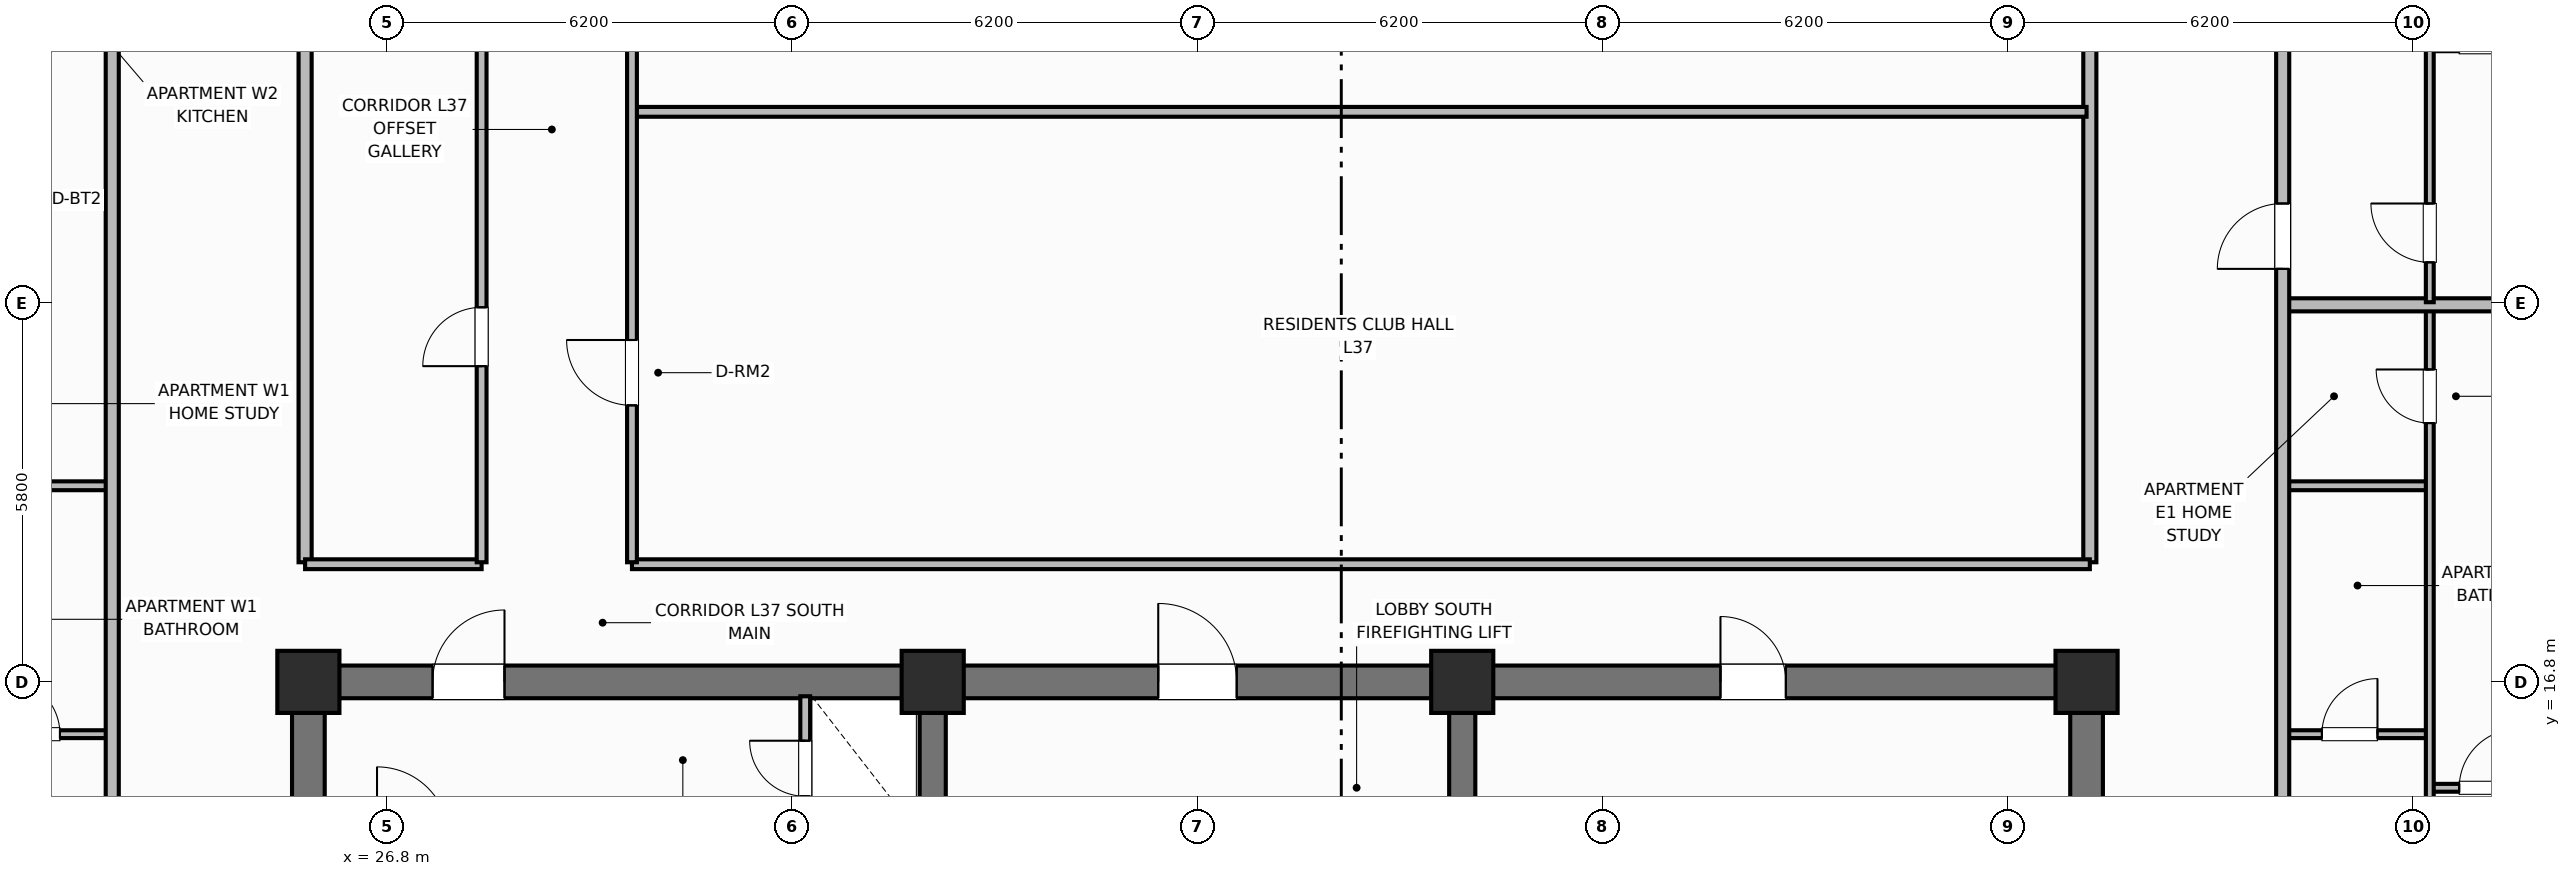
"""IFC4 building model, lengths in metres.
Left out: names, types, materials, properties, quantities, classifications, styles, units other than length and angle.
Written with IfcOpenShell. Run it as: python <this file> out.ifc"""

import sys

from ifc_helpers import new_model, si_unit, direction, frame, frame_2d, origin, origin_2d, place, context, subcontext, project, spatial, rectangle, extrude, element, fill, save


model = new_model("IFC4")
c1 = context("Model", 3, precision=1e-05, world=origin(), true_north=direction((0.0, 1.0)))
c2 = subcontext(c1, "Body", "Model", "MODEL_VIEW")
j1 = project(units=[si_unit("LENGTHUNIT", "METRE"), si_unit("PLANEANGLEUNIT", "RADIAN")], contexts=[c1])
p1 = place(None, origin())
s1 = spatial("IfcSite", under=j1, at=p1, CompositionType="ELEMENT")
p2 = place(p1, origin())
s2 = spatial("IfcBuilding", under=s1, at=p2, CompositionType="ELEMENT")
p3 = place(p2, frame((0.0, 0.0, 151.5)))
s3 = spatial("IfcBuildingStorey", under=s2, at=p3, CompositionType="ELEMENT", Elevation=151.5)
for number, where, z_axis, x_axis in (
    (1, (25.6, 10.85, 0.0), (0.0, 0.0, 1.0), (0.0, 1.0, 0.0)),
    (2, (52.8, 10.85, 0.0), (0.0, 0.0, 1.0), (0.0, 1.0, 0.0)),
):
    element("IfcWall", number, at=place(p3, frame(where, z_axis=z_axis, x_axis=x_axis)), inside=s3, PredefinedType="SHEAR", context=c2, shape_type="SweptSolid", body=[
        extrude(rectangle(XDim=5.7, YDim=0.5, at=frame_2d((2.85, 0.0))), origin(), (0.0, 0.0, 1.0), 3.7),
    ])
p4 = place(p3, frame((25.6, 16.8, 0.0), z_axis=(0.0, 0.0, 1.0), x_axis=(1.0, 0.0, 0.0)))
e3 = element("IfcWall", 3, at=p4, inside=s3, PredefinedType="SHEAR", context=c2, shape_type="SweptSolid", body=[
    extrude(rectangle(XDim=27.2, YDim=0.5, at=frame_2d((13.6, 0.0))), origin(), (0.0, 0.0, 1.0), 3.7),
])
p5 = place(p4, frame((1.9, 0.0, 0.0)))
e4 = element("IfcOpeningElement", 4, at=p5, cuts=e3, PredefinedType="OPENING", context=c2, shape_type="SweptSolid", body=[
    extrude(rectangle(XDim=1.1, YDim=2.15, at=frame_2d((0.55, 1.075))), frame((0.0, 0.26, 0.0), z_axis=(0.0, -1.0, 0.0), x_axis=(1.0, 0.0, 0.0)), (0.0, 0.0, 1.0), 0.52),
])
p6 = place(p4, frame((13.0, 0.0, 0.0)))
e5 = element("IfcOpeningElement", 5, at=p6, cuts=e3, PredefinedType="OPENING", context=c2, shape_type="SweptSolid", body=[
    extrude(rectangle(XDim=1.2, YDim=2.15, at=frame_2d((0.6, 1.075))), frame((0.0, 0.26, 0.0), z_axis=(0.0, -1.0, 0.0), x_axis=(1.0, 0.0, 0.0)), (0.0, 0.0, 1.0), 0.52),
])
p7 = place(p4, frame((21.6, 0.0, 0.0)))
e6 = element("IfcOpeningElement", 6, at=p7, cuts=e3, PredefinedType="OPENING", context=c2, shape_type="SweptSolid", body=[
    extrude(rectangle(XDim=1.0, YDim=2.15, at=frame_2d((0.5, 1.075))), frame((0.0, 0.26, 0.0), z_axis=(0.0, -1.0, 0.0), x_axis=(1.0, 0.0, 0.0)), (0.0, 0.0, 1.0), 0.52),
])
for number, where, z_axis, x_axis in (
    (7, (35.15, 10.85, 0.0), (0.0, 0.0, 1.0), (0.0, 1.0, 0.0)),
    (8, (43.25, 10.85, 0.0), (0.0, 0.0, 1.0), (0.0, 1.0, 0.0)),
):
    element("IfcWall", number, at=place(p3, frame(where, z_axis=z_axis, x_axis=x_axis)), inside=s3, PredefinedType="SHEAR", context=c2, shape_type="SweptSolid", body=[
        extrude(rectangle(XDim=5.7, YDim=0.4, at=frame_2d((2.85, 0.0))), origin(), (0.0, 0.0, 1.0), 3.7),
    ])
for number, where, z_axis, x_axis in (
    (9, (25.6, 16.8, 0.0), (0.0, 0.0, 1.0), (1.0, 0.0, 0.0)),
    (10, (35.15, 16.8, 0.0), (0.0, 0.0, 1.0), (1.0, 0.0, 0.0)),
    (11, (43.25, 16.8, 0.0), (0.0, 0.0, 1.0), (1.0, 0.0, 0.0)),
    (12, (52.8, 16.8, 0.0), (0.0, 0.0, 1.0), (1.0, 0.0, 0.0)),
):
    element("IfcColumn", number, at=place(p3, frame(where, z_axis=z_axis, x_axis=x_axis)), inside=s3, PredefinedType="COLUMN", context=c2, shape_type="SweptSolid", body=[
        extrude(rectangle(XDim=0.95, YDim=0.95, at=origin_2d()), origin(), (0.0, 0.0, 1.0), 3.7),
    ])
p8 = place(p3, frame((33.2, 14.5, 0.0), z_axis=(0.0, 0.0, 1.0), x_axis=(0.0, 1.0, 0.0)))
e13 = element("IfcWall", 13, at=p8, inside=s3, PredefinedType="PARTITIONING", context=c2, shape_type="SweptSolid", body=[
    extrude(rectangle(XDim=2.08, YDim=0.15, at=frame_2d((1.04, 0.0))), origin(), (0.0, 0.0, 1.0), 2.55),
])
p9 = place(p8, frame((0.55, 0.0, 0.0)))
e14 = element("IfcOpeningElement", 14, at=p9, cuts=e13, PredefinedType="OPENING", context=c2, shape_type="SweptSolid", body=[
    extrude(rectangle(XDim=0.85, YDim=2.05, at=frame_2d((0.425, 1.025))), frame((0.0, 0.085, 0.0), z_axis=(0.0, -1.0, 0.0), x_axis=(1.0, 0.0, 0.0)), (0.0, 0.0, 1.0), 0.17),
])
for number, where, z_axis, x_axis in (
    (15, (25.55, 18.63, 0.0), (0.0, 0.0, 1.0), (0.0, 1.0, 0.0)),
    (16, (52.85, 18.63, 0.0), (0.0, 0.0, 1.0), (0.0, 1.0, 0.0)),
):
    element("IfcWall", number, at=place(p3, frame(where, z_axis=z_axis, x_axis=x_axis)), inside=s3, PredefinedType="PARTITIONING", context=c2, shape_type="SweptSolid", body=[
        extrude(rectangle(XDim=19.14, YDim=0.2, at=frame_2d((9.57, 0.0))), origin(), (0.0, 0.0, 1.0), 2.55),
    ])
p10 = place(p3, frame((25.55, 18.6, 0.0), z_axis=(0.0, 0.0, 1.0), x_axis=(1.0, 0.0, 0.0)))
e17 = element("IfcWall", 17, at=p10, inside=s3, PredefinedType="PARTITIONING", context=c2, shape_type="SweptSolid", body=[
    extrude(rectangle(XDim=2.7, YDim=0.15, at=frame_2d((1.35, 0.0))), origin(), (0.0, 0.0, 1.0), 2.55),
])
p11 = place(p3, frame((30.55, 18.6, 0.0), z_axis=(0.0, 0.0, 1.0), x_axis=(1.0, 0.0, 0.0)))
e18 = element("IfcWall", 18, at=p11, inside=s3, PredefinedType="PARTITIONING", context=c2, shape_type="SweptSolid", body=[
    extrude(rectangle(XDim=22.3, YDim=0.15, at=frame_2d((11.15, 0.0))), origin(), (0.0, 0.0, 1.0), 2.55),
])
p12 = place(p3, frame((30.58, 25.521, 0.0), z_axis=(0.0, 0.0, 1.0), x_axis=(1.0, 0.0, 0.0)))
e19 = element("IfcWall", 19, at=p12, inside=s3, PredefinedType="PARTITIONING", context=c2, shape_type="SweptSolid", body=[
    extrude(rectangle(XDim=22.22, YDim=0.15, at=frame_2d((11.11, 0.0))), origin(), (0.0, 0.0, 1.0), 2.55),
])
p13 = place(p3, frame((28.25, 18.63, 0.0), z_axis=(0.0, 0.0, 1.0), x_axis=(0.0, 1.0, 0.0)))
e20 = element("IfcWall", 20, at=p13, inside=s3, PredefinedType="PARTITIONING", context=c2, shape_type="SweptSolid", body=[
    extrude(rectangle(XDim=19.14, YDim=0.15, at=frame_2d((9.57, 0.0))), origin(), (0.0, 0.0, 1.0), 2.55),
])
p14 = place(p13, frame((3.0, 0.0, 0.0)))
e21 = element("IfcOpeningElement", 21, at=p14, cuts=e20, PredefinedType="OPENING", context=c2, shape_type="SweptSolid", body=[
    extrude(rectangle(XDim=0.9, YDim=2.1, at=frame_2d((0.45, 1.05))), frame((0.0, 0.085, 0.0), z_axis=(0.0, -1.0, 0.0), x_axis=(1.0, 0.0, 0.0)), (0.0, 0.0, 1.0), 0.17),
])
p15 = place(p13, frame((11.5, 0.0, 0.0)))
e22 = element("IfcOpeningElement", 22, at=p15, cuts=e20, PredefinedType="OPENING", context=c2, shape_type="SweptSolid", body=[
    extrude(rectangle(XDim=0.9, YDim=2.1, at=frame_2d((0.45, 1.05))), frame((0.0, 0.085, 0.0), z_axis=(0.0, -1.0, 0.0), x_axis=(1.0, 0.0, 0.0)), (0.0, 0.0, 1.0), 0.17),
])
p16 = place(p3, frame((30.55, 18.63, 0.0), z_axis=(0.0, 0.0, 1.0), x_axis=(0.0, 1.0, 0.0)))
e23 = element("IfcWall", 23, at=p16, inside=s3, PredefinedType="PARTITIONING", context=c2, shape_type="SweptSolid", body=[
    extrude(rectangle(XDim=19.14, YDim=0.15, at=frame_2d((9.57, 0.0))), origin(), (0.0, 0.0, 1.0), 2.55),
])
p17 = place(p16, frame((2.4, 0.0, 0.0)))
e24 = element("IfcOpeningElement", 24, at=p17, cuts=e23, PredefinedType="OPENING", context=c2, shape_type="SweptSolid", body=[
    extrude(rectangle(XDim=1.0, YDim=2.15, at=frame_2d((0.5, 1.075))), frame((0.0, 0.085, 0.0), z_axis=(0.0, -1.0, 0.0), x_axis=(1.0, 0.0, 0.0)), (0.0, 0.0, 1.0), 0.17),
])
p18 = place(p16, frame((8.89, 0.0, 0.0)))
e25 = element("IfcOpeningElement", 25, at=p18, cuts=e23, PredefinedType="OPENING", context=c2, shape_type="SweptSolid", body=[
    extrude(rectangle(XDim=1.0, YDim=2.15, at=frame_2d((0.5, 1.075))), frame((0.0, 0.085, 0.0), z_axis=(0.0, -1.0, 0.0), x_axis=(1.0, 0.0, 0.0)), (0.0, 0.0, 1.0), 0.17),
])
p19 = place(p3, frame((20.35, 16.0, 0.0), z_axis=(0.0, 0.0, 1.0), x_axis=(1.0, 0.0, 0.0)))
e26 = element("IfcWall", 26, at=p19, inside=s3, PredefinedType="PARTITIONING", context=c2, shape_type="SweptSolid", body=[
    extrude(rectangle(XDim=2.25, YDim=0.12, at=frame_2d((1.125, 0.0))), origin(), (0.0, 0.0, 1.0), 2.55),
])
p20 = place(p19, frame((0.6, 0.0, 0.0)))
e27 = element("IfcOpeningElement", 27, at=p20, cuts=e26, PredefinedType="OPENING", context=c2, shape_type="SweptSolid", body=[
    extrude(rectangle(XDim=0.85, YDim=2.1, at=frame_2d((0.425, 1.05))), frame((0.0, 0.07, 0.0), z_axis=(0.0, -1.0, 0.0), x_axis=(1.0, 0.0, 0.0)), (0.0, 0.0, 1.0), 0.14),
])
p21 = place(p3, frame((20.35, 19.8, 0.0), z_axis=(0.0, 0.0, 1.0), x_axis=(1.0, 0.0, 0.0)))
e28 = element("IfcWall", 28, at=p21, inside=s3, PredefinedType="PARTITIONING", context=c2, shape_type="SweptSolid", body=[
    extrude(rectangle(XDim=2.25, YDim=0.135, at=frame_2d((1.125, 0.0))), origin(), (0.0, 0.0, 1.0), 2.55),
])
p22 = place(p3, frame((22.6, 10.6, 0.0), z_axis=(0.0, 0.0, 1.0), x_axis=(0.0, 1.0, 0.0)))
e29 = element("IfcWall", 29, at=p22, inside=s3, PredefinedType="PARTITIONING", context=c2, shape_type="SweptSolid", body=[
    extrude(rectangle(XDim=35.2, YDim=0.2, at=frame_2d((17.6, 0.0))), origin(), (0.0, 0.0, 1.0), 2.55),
])
p23 = place(p22, frame((2.65, 0.0, 0.0)))
e30 = element("IfcOpeningElement", 30, at=p23, cuts=e29, PredefinedType="OPENING", context=c2, shape_type="SweptSolid", body=[
    extrude(rectangle(XDim=1.0, YDim=2.15, at=frame_2d((0.5, 1.075))), frame((0.0, 0.11, 0.0), z_axis=(0.0, -1.0, 0.0), x_axis=(1.0, 0.0, 0.0)), (0.0, 0.0, 1.0), 0.22),
])
p24 = place(p22, frame((19.95, 0.0, 0.0)))
e31 = element("IfcOpeningElement", 31, at=p24, cuts=e29, PredefinedType="OPENING", context=c2, shape_type="SweptSolid", body=[
    extrude(rectangle(XDim=1.0, YDim=2.15, at=frame_2d((0.5, 1.075))), frame((0.0, 0.11, 0.0), z_axis=(0.0, -1.0, 0.0), x_axis=(1.0, 0.0, 0.0)), (0.0, 0.0, 1.0), 0.22),
])
p25 = place(p3, frame((55.8, 16.0, 0.0), z_axis=(0.0, 0.0, 1.0), x_axis=(1.0, 0.0, 0.0)))
e32 = element("IfcWall", 32, at=p25, inside=s3, PredefinedType="PARTITIONING", context=c2, shape_type="SweptSolid", body=[
    extrude(rectangle(XDim=2.25, YDim=0.12, at=frame_2d((1.125, 0.0))), origin(), (0.0, 0.0, 1.0), 2.55),
])
p26 = place(p25, frame((0.6, 0.0, 0.0)))
e33 = element("IfcOpeningElement", 33, at=p26, cuts=e32, PredefinedType="OPENING", context=c2, shape_type="SweptSolid", body=[
    extrude(rectangle(XDim=0.85, YDim=2.1, at=frame_2d((0.425, 1.05))), frame((0.0, 0.07, 0.0), z_axis=(0.0, -1.0, 0.0), x_axis=(1.0, 0.0, 0.0)), (0.0, 0.0, 1.0), 0.14),
])
p27 = place(p3, frame((55.8, 19.8, 0.0), z_axis=(0.0, 0.0, 1.0), x_axis=(1.0, 0.0, 0.0)))
e34 = element("IfcWall", 34, at=p27, inside=s3, PredefinedType="PARTITIONING", context=c2, shape_type="SweptSolid", body=[
    extrude(rectangle(XDim=2.25, YDim=0.135, at=frame_2d((1.125, 0.0))), origin(), (0.0, 0.0, 1.0), 2.55),
])
p28 = place(p3, frame((58.05, 15.18, 0.0), z_axis=(0.0, 0.0, 1.0), x_axis=(1.0, 0.0, 0.0)))
e35 = element("IfcWall", 35, at=p28, inside=s3, PredefinedType="PARTITIONING", context=c2, shape_type="SweptSolid", body=[
    extrude(rectangle(XDim=3.78, YDim=0.12, at=frame_2d((1.89, 0.0))), origin(), (0.0, 0.0, 1.0), 2.55),
])
p29 = place(p28, frame((0.45, 0.0, 0.0)))
e36 = element("IfcOpeningElement", 36, at=p29, cuts=e35, PredefinedType="OPENING", context=c2, shape_type="SweptSolid", body=[
    extrude(rectangle(XDim=0.9, YDim=2.1, at=frame_2d((0.45, 1.05))), frame((0.0, 0.07, 0.0), z_axis=(0.0, -1.0, 0.0), x_axis=(1.0, 0.0, 0.0)), (0.0, 0.0, 1.0), 0.14),
])
p30 = place(p3, frame((58.05, 10.64, 0.0), z_axis=(0.0, 0.0, 1.0), x_axis=(0.0, 1.0, 0.0)))
e37 = element("IfcWall", 37, at=p30, inside=s3, PredefinedType="PARTITIONING", context=c2, shape_type="SweptSolid", body=[
    extrude(rectangle(XDim=11.888, YDim=0.12, at=frame_2d((5.944, 0.0))), origin(), (0.0, 0.0, 1.0), 2.55),
])
p31 = place(p30, frame((0.41, 0.0, 0.0)))
e38 = element("IfcOpeningElement", 38, at=p31, cuts=e37, PredefinedType="OPENING", context=c2, shape_type="SweptSolid", body=[
    extrude(rectangle(XDim=0.9, YDim=2.1, at=frame_2d((0.45, 1.05))), frame((0.0, 0.07, 0.0), z_axis=(0.0, -1.0, 0.0), x_axis=(1.0, 0.0, 0.0)), (0.0, 0.0, 1.0), 0.14),
])
p32 = place(p30, frame((10.119, 0.0, 0.0)))
e39 = element("IfcOpeningElement", 39, at=p32, cuts=e37, PredefinedType="OPENING", context=c2, shape_type="SweptSolid", body=[
    extrude(rectangle(XDim=0.82, YDim=2.08, at=frame_2d((0.41, 1.04))), frame((0.0, 0.07, 0.0), z_axis=(0.0, -1.0, 0.0), x_axis=(1.0, 0.0, 0.0)), (0.0, 0.0, 1.0), 0.14),
])
p33 = place(p3, frame((55.8, 22.568, 0.0), z_axis=(0.0, 0.0, 1.0), x_axis=(1.0, 0.0, 0.0)))
e40 = element("IfcWall", 40, at=p33, inside=s3, PredefinedType="PARTITIONING", context=c2, shape_type="SweptSolid", body=[
    extrude(rectangle(XDim=6.03, YDim=0.2, at=frame_2d((3.015, 0.0))), origin(), (0.0, 0.0, 1.0), 2.55),
])
p34 = place(p3, frame((58.05, 22.608, 0.0), z_axis=(0.0, 0.0, 1.0), x_axis=(0.0, 1.0, 0.0)))
e41 = element("IfcWall", 41, at=p34, inside=s3, PredefinedType="PARTITIONING", context=c2, shape_type="SweptSolid", body=[
    extrude(rectangle(XDim=11.052, YDim=0.12, at=frame_2d((5.526, 0.0))), origin(), (0.0, 0.0, 1.0), 2.55),
])
p35 = place(p34, frame((0.61, 0.0, 0.0)))
e42 = element("IfcOpeningElement", 42, at=p35, cuts=e41, PredefinedType="OPENING", context=c2, shape_type="SweptSolid", body=[
    extrude(rectangle(XDim=0.9, YDim=2.1, at=frame_2d((0.45, 1.05))), frame((0.0, 0.07, 0.0), z_axis=(0.0, -1.0, 0.0), x_axis=(1.0, 0.0, 0.0)), (0.0, 0.0, 1.0), 0.14),
])
p36 = place(p3, frame((55.8, 10.6, 0.0), z_axis=(0.0, 0.0, 1.0), x_axis=(0.0, 1.0, 0.0)))
e43 = element("IfcWall", 43, at=p36, inside=s3, PredefinedType="PARTITIONING", context=c2, shape_type="SweptSolid", body=[
    extrude(rectangle(XDim=35.2, YDim=0.2, at=frame_2d((17.6, 0.0))), origin(), (0.0, 0.0, 1.0), 2.55),
])
p37 = place(p36, frame((2.65, 0.0, 0.0)))
e44 = element("IfcOpeningElement", 44, at=p37, cuts=e43, PredefinedType="OPENING", context=c2, shape_type="SweptSolid", body=[
    extrude(rectangle(XDim=1.0, YDim=2.15, at=frame_2d((0.5, 1.075))), frame((0.0, 0.11, 0.0), z_axis=(0.0, -1.0, 0.0), x_axis=(1.0, 0.0, 0.0)), (0.0, 0.0, 1.0), 0.22),
])
p38 = place(p36, frame((12.518, 0.0, 0.0)))
e45 = element("IfcOpeningElement", 45, at=p38, cuts=e43, PredefinedType="OPENING", context=c2, shape_type="SweptSolid", body=[
    extrude(rectangle(XDim=1.0, YDim=2.15, at=frame_2d((0.5, 1.075))), frame((0.0, 0.11, 0.0), z_axis=(0.0, -1.0, 0.0), x_axis=(1.0, 0.0, 0.0)), (0.0, 0.0, 1.0), 0.22),
])
p39 = place(p36, frame((23.65, 0.0, 0.0)))
e46 = element("IfcOpeningElement", 46, at=p39, cuts=e43, PredefinedType="OPENING", context=c2, shape_type="SweptSolid", body=[
    extrude(rectangle(XDim=1.0, YDim=2.15, at=frame_2d((0.5, 1.075))), frame((0.0, 0.11, 0.0), z_axis=(0.0, -1.0, 0.0), x_axis=(1.0, 0.0, 0.0)), (0.0, 0.0, 1.0), 0.22),
])
p40 = place(p9, origin())
e47 = element("IfcDoor", 47, at=p40, inside=s3, OperationType="SINGLE_SWING_RIGHT", PredefinedType="TRAPDOOR", context=c2, shape_type="SweptSolid", body=[
    extrude(rectangle(XDim=0.85, YDim=2.05, at=frame_2d((0.425, 1.025))), frame((0.0, 0.025, 0.0), z_axis=(0.0, -1.0, 0.0), x_axis=(1.0, 0.0, 0.0)), (0.0, 0.0, 1.0), 0.05),
])
fill(e14, e47)
p41 = place(p14, origin())
e48 = element("IfcDoor", 48, at=p41, inside=s3, OperationType="SINGLE_SWING_LEFT", PredefinedType="DOOR", context=c2, shape_type="SweptSolid", body=[
    extrude(rectangle(XDim=0.9, YDim=2.1, at=frame_2d((0.45, 1.05))), frame((0.0, 0.025, 0.0), z_axis=(0.0, -1.0, 0.0), x_axis=(1.0, 0.0, 0.0)), (0.0, 0.0, 1.0), 0.05),
])
fill(e21, e48)
p42 = place(p17, origin())
e49 = element("IfcDoor", 49, at=p42, inside=s3, OperationType="SINGLE_SWING_RIGHT", PredefinedType="DOOR", context=c2, shape_type="SweptSolid", body=[
    extrude(rectangle(XDim=1.0, YDim=2.15, at=frame_2d((0.5, 1.075))), frame((0.0, 0.025, 0.0), z_axis=(0.0, -1.0, 0.0), x_axis=(1.0, 0.0, 0.0)), (0.0, 0.0, 1.0), 0.05),
])
fill(e24, e49)
p43 = place(p20, origin())
e50 = element("IfcDoor", 50, at=p43, inside=s3, OperationType="SINGLE_SWING_LEFT", PredefinedType="DOOR", context=c2, shape_type="SweptSolid", body=[
    extrude(rectangle(XDim=0.85, YDim=2.1, at=frame_2d((0.425, 1.05))), frame((0.0, 0.025, 0.0), z_axis=(0.0, -1.0, 0.0), x_axis=(1.0, 0.0, 0.0)), (0.0, 0.0, 1.0), 0.05),
])
fill(e27, e50)
p44 = place(p26, origin())
e51 = element("IfcDoor", 51, at=p44, inside=s3, OperationType="SINGLE_SWING_RIGHT", PredefinedType="DOOR", context=c2, shape_type="SweptSolid", body=[
    extrude(rectangle(XDim=0.85, YDim=2.1, at=frame_2d((0.425, 1.05))), frame((0.0, 0.025, 0.0), z_axis=(0.0, -1.0, 0.0), x_axis=(1.0, 0.0, 0.0)), (0.0, 0.0, 1.0), 0.05),
])
fill(e33, e51)
p45 = place(p29, origin())
e52 = element("IfcDoor", 52, at=p45, inside=s3, OperationType="SINGLE_SWING_RIGHT", PredefinedType="DOOR", context=c2, shape_type="SweptSolid", body=[
    extrude(rectangle(XDim=0.9, YDim=2.1, at=frame_2d((0.45, 1.05))), frame((0.0, 0.025, 0.0), z_axis=(0.0, -1.0, 0.0), x_axis=(1.0, 0.0, 0.0)), (0.0, 0.0, 1.0), 0.05),
])
fill(e36, e52)
p46 = place(p32, origin())
e53 = element("IfcDoor", 53, at=p46, inside=s3, OperationType="SINGLE_SWING_RIGHT", PredefinedType="DOOR", context=c2, shape_type="SweptSolid", body=[
    extrude(rectangle(XDim=0.82, YDim=2.08, at=frame_2d((0.41, 1.04))), frame((0.0, 0.025, 0.0), z_axis=(0.0, -1.0, 0.0), x_axis=(1.0, 0.0, 0.0)), (0.0, 0.0, 1.0), 0.05),
])
fill(e39, e53)
p47 = place(p35, origin())
e54 = element("IfcDoor", 54, at=p47, inside=s3, OperationType="SINGLE_SWING_RIGHT", PredefinedType="DOOR", context=c2, shape_type="SweptSolid", body=[
    extrude(rectangle(XDim=0.9, YDim=2.1, at=frame_2d((0.45, 1.05))), frame((0.0, 0.025, 0.0), z_axis=(0.0, -1.0, 0.0), x_axis=(1.0, 0.0, 0.0)), (0.0, 0.0, 1.0), 0.05),
])
fill(e42, e54)
p48 = place(p38, origin())
e55 = element("IfcDoor", 55, at=p48, inside=s3, OperationType="SINGLE_SWING_LEFT", PredefinedType="DOOR", context=c2, shape_type="SweptSolid", body=[
    extrude(rectangle(XDim=1.0, YDim=2.15, at=frame_2d((0.5, 1.075))), frame((0.0, 0.025, 0.0), z_axis=(0.0, -1.0, 0.0), x_axis=(1.0, 0.0, 0.0)), (0.0, 0.0, 1.0), 0.05),
])
fill(e45, e55)
p49 = place(p5, origin())
e56 = element("IfcDoor", 56, at=p49, inside=s3, OperationType="SINGLE_SWING_RIGHT", PredefinedType="DOOR", context=c2, shape_type="SweptSolid", body=[
    extrude(rectangle(XDim=1.1, YDim=2.15, at=frame_2d((0.55, 1.075))), frame((0.0, 0.025, 0.0), z_axis=(0.0, -1.0, 0.0), x_axis=(1.0, 0.0, 0.0)), (0.0, 0.0, 1.0), 0.05),
])
fill(e4, e56)
p50 = place(p6, origin())
e57 = element("IfcDoor", 57, at=p50, inside=s3, OperationType="SINGLE_SWING_LEFT", PredefinedType="DOOR", context=c2, shape_type="SweptSolid", body=[
    extrude(rectangle(XDim=1.2, YDim=2.15, at=frame_2d((0.6, 1.075))), frame((0.0, 0.025, 0.0), z_axis=(0.0, -1.0, 0.0), x_axis=(1.0, 0.0, 0.0)), (0.0, 0.0, 1.0), 0.05),
])
fill(e5, e57)
p51 = place(p7, origin())
e58 = element("IfcDoor", 58, at=p51, inside=s3, OperationType="SINGLE_SWING_LEFT", PredefinedType="DOOR", context=c2, shape_type="SweptSolid", body=[
    extrude(rectangle(XDim=1.0, YDim=2.15, at=frame_2d((0.5, 1.075))), frame((0.0, 0.025, 0.0), z_axis=(0.0, -1.0, 0.0), x_axis=(1.0, 0.0, 0.0)), (0.0, 0.0, 1.0), 0.05),
])
fill(e6, e58)
save(model, sys.argv[1])
